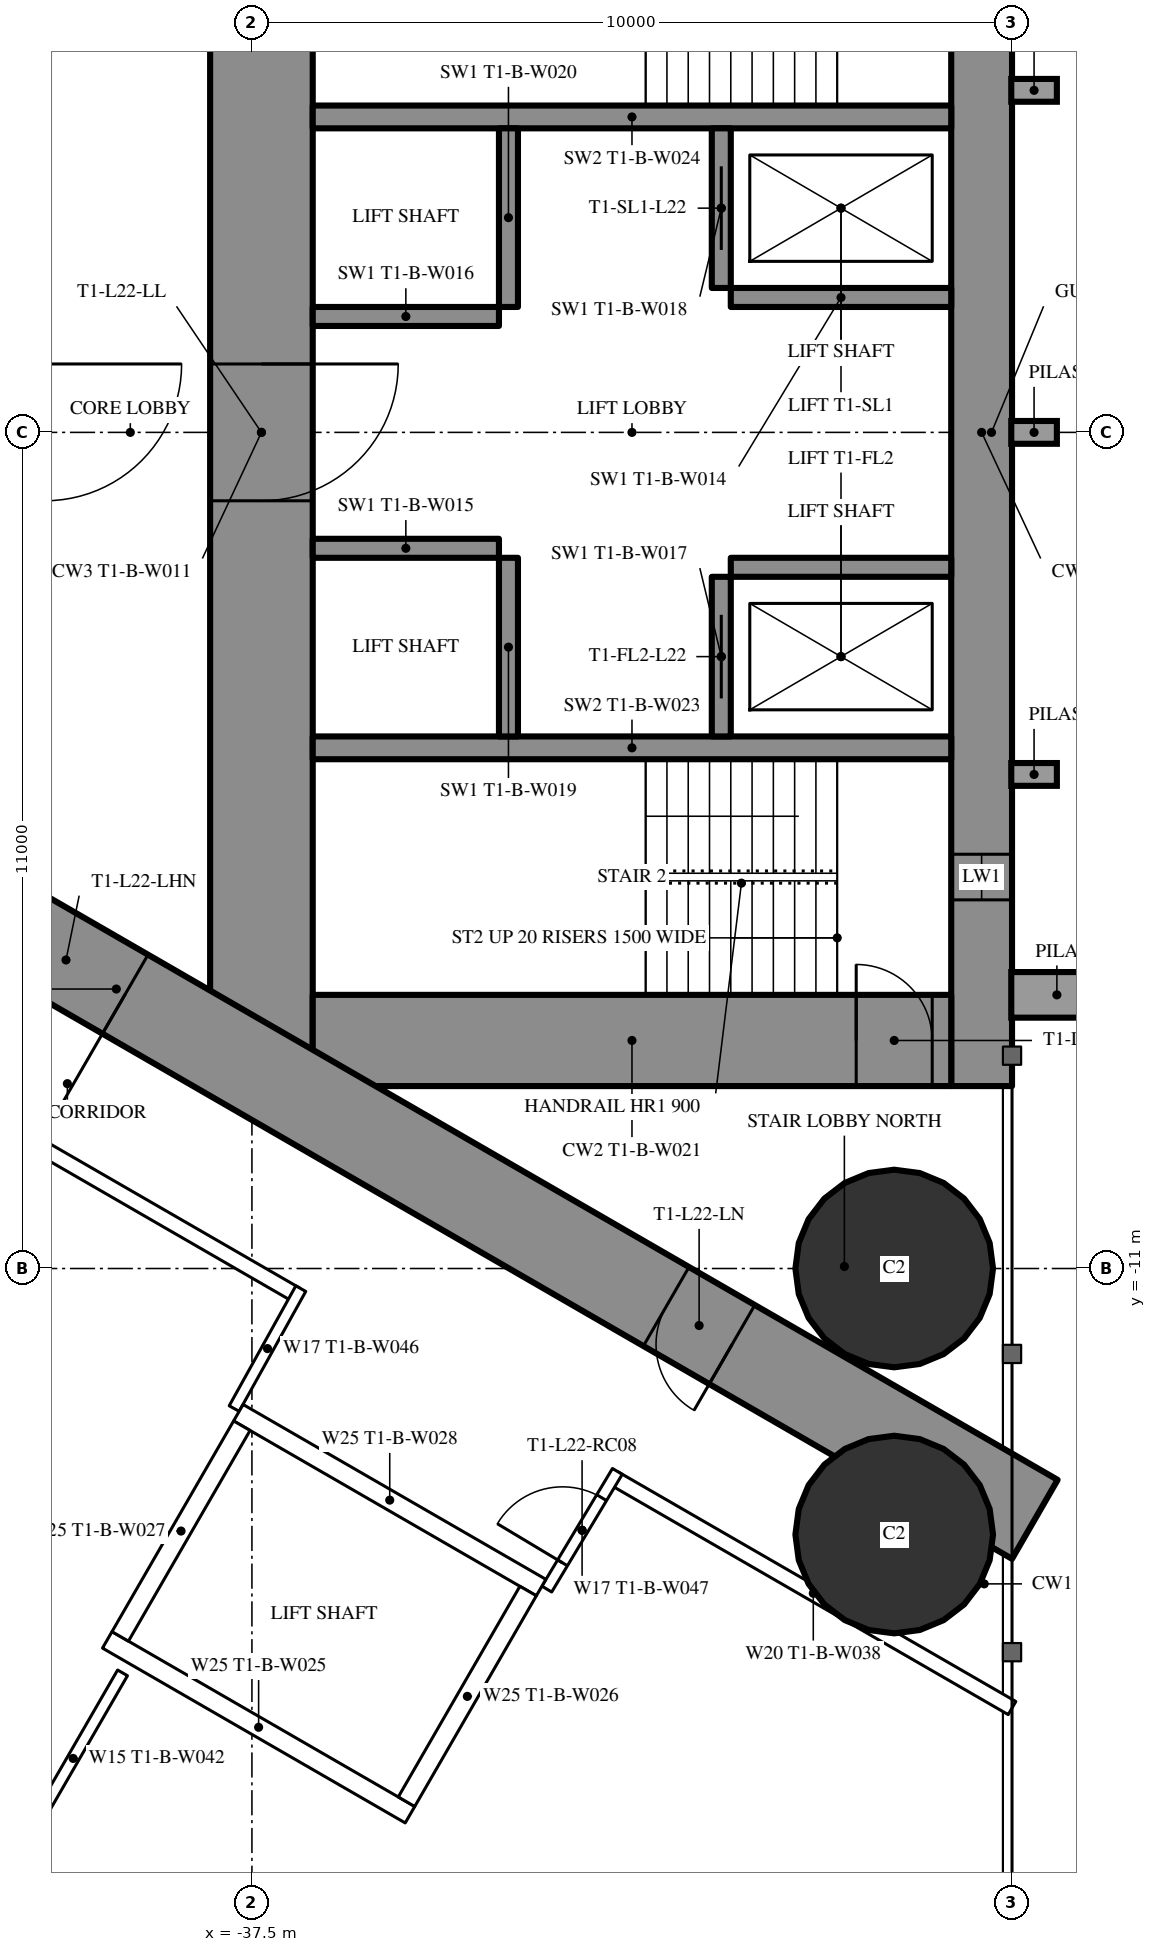
"""IFC4 building model, lengths in metres.
Left out: names, types, materials, properties, quantities, classifications, styles, units other than length and angle.
Written with IfcOpenShell. Run it as: python <this file> out.ifc"""

import sys

from ifc_helpers import new_model, si_unit, direction, frame, frame_2d, origin, origin_2d, place, context, subcontext, project, spatial, rectangle, hollow_circle, extrude, element, fill, save


model = new_model("IFC4")
c1 = context("Model", 3, precision=1e-05, world=origin(), true_north=direction((0.0, 1.0)))
c2 = subcontext(c1, "Body", "Model", "MODEL_VIEW")
j1 = project(units=[si_unit("LENGTHUNIT", "METRE"), si_unit("PLANEANGLEUNIT", "RADIAN")], contexts=[c1])
p1 = place(None, origin())
s1 = spatial("IfcSite", under=j1, at=p1, CompositionType="ELEMENT")
p2 = place(p1, origin())
s2 = spatial("IfcBuilding", under=s1, at=p2, CompositionType="ELEMENT")
p3 = place(p2, frame((0.0, 0.0, 87.0)))
s3 = spatial("IfcBuildingStorey", under=s2, at=p3, CompositionType="ELEMENT", Elevation=87.0)
for number, where, z_axis, x_axis in (
    (1, (-29.05, -11.0, 0.0), (0.0, 0.0, 1.0), (1.0, 0.0, 0.0)),
    (2, (-29.05, -14.5, 0.0), (0.0, 0.0, 1.0), (1.0, 0.0, 0.0)),
    (3, (-41.245, -19.666, 0.0), (0.0, 0.0, 1.0), (1.0, 0.0, 0.0)),
):
    element("IfcColumn", number, at=place(p3, frame(where, z_axis=z_axis, x_axis=x_axis)), inside=s3, PredefinedType="COLUMN", context=c2, shape_type="SweptSolid", body=[
        extrude(hollow_circle(Radius=1.3, WallThickness=0.1, at=origin_2d()), origin(), (0.0, 0.0, 1.0), 3.6),
    ])
p4 = place(p3, frame((-27.9, 8.6, 0.0), z_axis=(0.0, 0.0, 1.0), x_axis=(0.0, -1.0, 0.0)))
e4 = element("IfcWall", 4, at=p4, inside=s3, PredefinedType="SHEAR", context=c2, shape_type="SweptSolid", body=[
    extrude(rectangle(XDim=17.2, YDim=0.8, at=frame_2d((8.6, 0.0))), origin(), (0.0, 0.0, 1.0), 3.6),
])
p5 = place(p4, frame((2.45, 0.0, 0.6)))
e5 = element("IfcOpeningElement", 5, at=p5, cuts=e4, PredefinedType="OPENING", context=c2, shape_type="SweptSolid", body=[
    extrude(rectangle(XDim=0.6, YDim=2.1, at=frame_2d((0.3, 1.05))), frame((0.0, 0.41, 0.0), z_axis=(0.0, -1.0, 0.0), x_axis=(1.0, 0.0, 0.0)), (0.0, 0.0, 1.0), 0.82),
])
p6 = place(p4, frame((14.15, 0.0, 0.6)))
e6 = element("IfcOpeningElement", 6, at=p6, cuts=e4, PredefinedType="OPENING", context=c2, shape_type="SweptSolid", body=[
    extrude(rectangle(XDim=0.6, YDim=2.1, at=frame_2d((0.3, 1.05))), frame((0.0, 0.41, 0.0), z_axis=(0.0, -1.0, 0.0), x_axis=(1.0, 0.0, 0.0)), (0.0, 0.0, 1.0), 0.82),
])
p7 = place(p3, frame((-37.375, 8.6, 0.0), z_axis=(0.0, 0.0, 1.0), x_axis=(0.0, -1.0, 0.0)))
e7 = element("IfcWall", 7, at=p7, inside=s3, PredefinedType="SHEAR", context=c2, shape_type="SweptSolid", body=[
    extrude(rectangle(XDim=17.2, YDim=1.35, at=frame_2d((8.6, 0.0))), origin(), (0.0, 0.0, 1.0), 3.6),
])
p8 = place(p7, frame((7.7, 0.0, 0.0)))
e8 = element("IfcOpeningElement", 8, at=p8, cuts=e7, PredefinedType="OPENING", context=c2, shape_type="SweptSolid", body=[
    extrude(rectangle(XDim=1.8, YDim=2.2, at=frame_2d((0.9, 1.1))), frame((0.0, 0.685, 0.0), z_axis=(0.0, -1.0, 0.0), x_axis=(1.0, 0.0, 0.0)), (0.0, 0.0, 1.0), 1.37),
])
p9 = place(p3, frame((-28.3, -8.0, 0.0), z_axis=(0.0, 0.0, 1.0), x_axis=(-1.0, 0.0, 0.0)))
e9 = element("IfcWall", 9, at=p9, inside=s3, PredefinedType="SHEAR", context=c2, shape_type="SweptSolid", body=[
    extrude(rectangle(XDim=8.4, YDim=1.2, at=frame_2d((4.2, 0.0))), origin(), (0.0, 0.0, 1.0), 3.6),
])
p10 = place(p9, frame((0.25, 0.0, 0.0)))
e10 = element("IfcOpeningElement", 10, at=p10, cuts=e9, PredefinedType="OPENING", context=c2, shape_type="SweptSolid", body=[
    extrude(rectangle(XDim=1.0, YDim=2.2, at=frame_2d((0.5, 1.1))), frame((0.0, 0.61, 0.0), z_axis=(0.0, -1.0, 0.0), x_axis=(1.0, 0.0, 0.0)), (0.0, 0.0, 1.0), 1.22),
])
for number, where, z_axis, x_axis in (
    (11, (-28.3, 4.15, 0.0), (0.0, 0.0, 1.0), (-1.0, 0.0, 0.0)),
    (12, (-28.3, -4.15, 0.0), (0.0, 0.0, 1.0), (-1.0, 0.0, 0.0)),
):
    element("IfcWall", number, at=place(p3, frame(where, z_axis=z_axis, x_axis=x_axis)), inside=s3, PredefinedType="SHEAR", context=c2, shape_type="SweptSolid", body=[
        extrude(rectangle(XDim=8.4, YDim=0.3, at=frame_2d((4.2, 0.0))), origin(), (0.0, 0.0, 1.0), 3.6),
    ])
p11 = place(p3, frame((-31.325, 4.0, 0.0), z_axis=(0.0, 0.0, 1.0), x_axis=(0.0, -1.0, 0.0)))
e13 = element("IfcWall", 13, at=p11, inside=s3, PredefinedType="SHEAR", context=c2, shape_type="SweptSolid", body=[
    extrude(rectangle(XDim=2.1, YDim=0.25, at=frame_2d((1.05, 0.0))), origin(), (0.0, 0.0, 1.0), 3.6),
])
p12 = place(p11, frame((0.5, 0.0, 0.0)))
e14 = element("IfcOpeningElement", 14, at=p12, cuts=e13, PredefinedType="OPENING", context=c2, shape_type="SweptSolid", body=[
    extrude(rectangle(XDim=1.1, YDim=2.2, at=frame_2d((0.55, 1.1))), frame((0.0, 0.135, 0.0), z_axis=(0.0, -1.0, 0.0), x_axis=(1.0, 0.0, 0.0)), (0.0, 0.0, 1.0), 0.27),
])
p13 = place(p3, frame((-34.125, 4.0, 0.0), z_axis=(0.0, 0.0, 1.0), x_axis=(0.0, -1.0, 0.0)))
e15 = element("IfcWall", 15, at=p13, inside=s3, PredefinedType="SHEAR", context=c2, shape_type="SweptSolid", body=[
    extrude(rectangle(XDim=2.35, YDim=0.25, at=frame_2d((1.175, 0.0))), origin(), (0.0, 0.0, 1.0), 3.6),
])
p14 = place(p3, frame((-28.3, 1.775, 0.0), z_axis=(0.0, 0.0, 1.0), x_axis=(-1.0, 0.0, 0.0)))
e16 = element("IfcWall", 16, at=p14, inside=s3, PredefinedType="SHEAR", context=c2, shape_type="SweptSolid", body=[
    extrude(rectangle(XDim=2.9, YDim=0.25, at=frame_2d((1.45, 0.0))), origin(), (0.0, 0.0, 1.0), 3.6),
])
p15 = place(p3, frame((-34.25, 1.525, 0.0), z_axis=(0.0, 0.0, 1.0), x_axis=(-1.0, 0.0, 0.0)))
e17 = element("IfcWall", 17, at=p15, inside=s3, PredefinedType="SHEAR", context=c2, shape_type="SweptSolid", body=[
    extrude(rectangle(XDim=2.45, YDim=0.25, at=frame_2d((1.225, 0.0))), origin(), (0.0, 0.0, 1.0), 3.6),
])
p16 = place(p3, frame((-31.325, -1.9, 0.0), z_axis=(0.0, 0.0, 1.0), x_axis=(0.0, -1.0, 0.0)))
e18 = element("IfcWall", 18, at=p16, inside=s3, PredefinedType="SHEAR", context=c2, shape_type="SweptSolid", body=[
    extrude(rectangle(XDim=2.1, YDim=0.25, at=frame_2d((1.05, 0.0))), origin(), (0.0, 0.0, 1.0), 3.6),
])
p17 = place(p16, frame((0.5, 0.0, 0.0)))
e19 = element("IfcOpeningElement", 19, at=p17, cuts=e18, PredefinedType="OPENING", context=c2, shape_type="SweptSolid", body=[
    extrude(rectangle(XDim=1.1, YDim=2.2, at=frame_2d((0.55, 1.1))), frame((0.0, 0.135, 0.0), z_axis=(0.0, -1.0, 0.0), x_axis=(1.0, 0.0, 0.0)), (0.0, 0.0, 1.0), 0.27),
])
p18 = place(p3, frame((-34.125, -1.65, 0.0), z_axis=(0.0, 0.0, 1.0), x_axis=(0.0, -1.0, 0.0)))
e20 = element("IfcWall", 20, at=p18, inside=s3, PredefinedType="SHEAR", context=c2, shape_type="SweptSolid", body=[
    extrude(rectangle(XDim=2.35, YDim=0.25, at=frame_2d((1.175, 0.0))), origin(), (0.0, 0.0, 1.0), 3.6),
])
p19 = place(p3, frame((-28.3, -1.775, 0.0), z_axis=(0.0, 0.0, 1.0), x_axis=(-1.0, 0.0, 0.0)))
e21 = element("IfcWall", 21, at=p19, inside=s3, PredefinedType="SHEAR", context=c2, shape_type="SweptSolid", body=[
    extrude(rectangle(XDim=2.9, YDim=0.25, at=frame_2d((1.45, 0.0))), origin(), (0.0, 0.0, 1.0), 3.6),
])
p20 = place(p3, frame((-34.25, -1.525, 0.0), z_axis=(0.0, 0.0, 1.0), x_axis=(-1.0, 0.0, 0.0)))
e22 = element("IfcWall", 22, at=p20, inside=s3, PredefinedType="SHEAR", context=c2, shape_type="SweptSolid", body=[
    extrude(rectangle(XDim=2.45, YDim=0.25, at=frame_2d((1.225, 0.0))), origin(), (0.0, 0.0, 1.0), 3.6),
])
p21 = place(p3, frame((-27.2, 14.3, 0.0), z_axis=(0.0, 0.0, 1.0), x_axis=(-0.866026593062, -0.499997940104, 0.0)))
e23 = element("IfcWall", 23, at=p21, inside=s3, PredefinedType="SHEAR", context=c2, shape_type="SweptSolid", body=[
    extrude(rectangle(XDim=28.946, YDim=1.2, at=frame_2d((14.473, 0.0))), origin(), (0.0, 0.0, 1.0), 3.6),
])
p22 = place(p21, frame((4.6, 0.0, 0.0)))
e24 = element("IfcOpeningElement", 24, at=p22, cuts=e23, PredefinedType="OPENING", context=c2, shape_type="SweptSolid", body=[
    extrude(rectangle(XDim=1.0, YDim=2.2, at=frame_2d((0.5, 1.1))), frame((0.0, 0.61, 0.0), z_axis=(0.0, -1.0, 0.0), x_axis=(1.0, 0.0, 0.0)), (0.0, 0.0, 1.0), 1.22),
])
p23 = place(p21, frame((13.568, 0.0, 0.0)))
e25 = element("IfcOpeningElement", 25, at=p23, cuts=e23, PredefinedType="OPENING", context=c2, shape_type="SweptSolid", body=[
    extrude(rectangle(XDim=1.8, YDim=2.03, at=frame_2d((0.9, 1.015))), frame((0.0, 0.61, 0.0), z_axis=(0.0, -1.0, 0.0), x_axis=(1.0, 0.0, 0.0)), (0.0, 0.0, 1.0), 1.22),
])
p24 = place(p3, frame((-27.2, -14.3, 0.0), z_axis=(0.0, 0.0, 1.0), x_axis=(-0.866024021859, 0.500002393557, 0.0)))
e26 = element("IfcWall", 26, at=p24, inside=s3, PredefinedType="SHEAR", context=c2, shape_type="SweptSolid", body=[
    extrude(rectangle(XDim=27.907, YDim=1.2, at=frame_2d((13.954, 0.0))), origin(), (0.0, 0.0, 1.0), 3.6),
])
p25 = place(p24, frame((4.6, 0.0, 0.0)))
e27 = element("IfcOpeningElement", 27, at=p25, cuts=e26, PredefinedType="OPENING", context=c2, shape_type="SweptSolid", body=[
    extrude(rectangle(XDim=1.0, YDim=2.2, at=frame_2d((0.5, 1.1))), frame((0.0, 0.61, 0.0), z_axis=(0.0, -1.0, 0.0), x_axis=(1.0, 0.0, 0.0)), (0.0, 0.0, 1.0), 1.22),
])
p26 = place(p24, frame((13.818, 0.0, 0.0)))
e28 = element("IfcOpeningElement", 28, at=p26, cuts=e26, PredefinedType="OPENING", context=c2, shape_type="SweptSolid", body=[
    extrude(rectangle(XDim=1.8, YDim=2.2, at=frame_2d((0.9, 1.1))), frame((0.0, 0.61, 0.0), z_axis=(0.0, -1.0, 0.0), x_axis=(1.0, 0.0, 0.0)), (0.0, 0.0, 1.0), 1.22),
])
p27 = place(p3, frame((-39.202, -16.32, 0.0), z_axis=(0.0, 0.0, 1.0), x_axis=(-0.49997716683, -0.86603858612, 0.0)))
e29 = element("IfcWall", 29, at=p27, inside=s3, PredefinedType="PARTITIONING", context=c2, shape_type="SweptSolid", body=[
    extrude(rectangle(XDim=2.6, YDim=0.15, at=frame_2d((1.3, 0.0))), origin(), (0.0, 0.0, 1.0), 3.35),
])
p28 = place(p3, frame((-37.7, 10.894, 0.0), z_axis=(0.0, 0.0, 1.0), x_axis=(-0.866027905338, -0.499995667157, 0.0)))
e30 = element("IfcWall", 30, at=p28, inside=s3, PredefinedType="PARTITIONING", context=c2, shape_type="SweptSolid", body=[
    extrude(rectangle(XDim=21.787, YDim=0.2, at=frame_2d((10.894, 0.0))), origin(), (0.0, 0.0, 1.0), 3.35),
])
p29 = place(p28, frame((15.094, 0.0, 0.0)))
e31 = element("IfcOpeningElement", 31, at=p29, cuts=e30, PredefinedType="OPENING", context=c2, shape_type="SweptSolid", body=[
    extrude(rectangle(XDim=1.8, YDim=2.2, at=frame_2d((0.9, 1.1))), frame((0.0, 0.11, 0.0), z_axis=(0.0, -1.0, 0.0), x_axis=(1.0, 0.0, 0.0)), (0.0, 0.0, 1.0), 0.22),
])
p30 = place(p28, frame((4.201, 0.0, 0.0)))
e32 = element("IfcOpeningElement", 32, at=p30, cuts=e30, PredefinedType="OPENING", context=c2, shape_type="SweptSolid", body=[
    extrude(rectangle(XDim=1.8, YDim=2.2, at=frame_2d((0.9, 1.1))), frame((0.0, 0.11, 0.0), z_axis=(0.0, -1.0, 0.0), x_axis=(1.0, 0.0, 0.0)), (0.0, 0.0, 1.0), 0.22),
])
p31 = place(p3, frame((-27.5, -16.782, 0.0), z_axis=(0.0, 0.0, 1.0), x_axis=(-0.866030050624, 0.499991951352, 0.0)))
e33 = element("IfcWall", 33, at=p31, inside=s3, PredefinedType="PARTITIONING", context=c2, shape_type="SweptSolid", body=[
    extrude(rectangle(XDim=6.038, YDim=0.2, at=frame_2d((3.019, 0.0))), origin(), (0.0, 0.0, 1.0), 3.35),
])
p32 = place(p3, frame((-36.92, -11.344, 0.0), z_axis=(0.0, 0.0, 1.0), x_axis=(-0.866028313256, 0.499994960614, 0.0)))
e34 = element("IfcWall", 34, at=p32, inside=s3, PredefinedType="PARTITIONING", context=c2, shape_type="SweptSolid", body=[
    extrude(rectangle(XDim=22.568, YDim=0.2, at=frame_2d((11.284, 0.0))), origin(), (0.0, 0.0, 1.0), 3.35),
])
p33 = place(p32, frame((15.994, 0.0, 0.0)))
e35 = element("IfcOpeningElement", 35, at=p33, cuts=e34, PredefinedType="OPENING", context=c2, shape_type="SweptSolid", body=[
    extrude(rectangle(XDim=1.8, YDim=2.2, at=frame_2d((0.9, 1.1))), frame((0.0, 0.11, 0.0), z_axis=(0.0, -1.0, 0.0), x_axis=(1.0, 0.0, 0.0)), (0.0, 0.0, 1.0), 0.22),
])
p34 = place(p32, frame((4.551, 0.0, 0.0)))
e36 = element("IfcOpeningElement", 36, at=p34, cuts=e34, PredefinedType="OPENING", context=c2, shape_type="SweptSolid", body=[
    extrude(rectangle(XDim=2.0, YDim=2.4, at=frame_2d((1.0, 1.2))), frame((0.0, 0.11, 0.0), z_axis=(0.0, -1.0, 0.0), x_axis=(1.0, 0.0, 0.0)), (0.0, 0.0, 1.0), 0.22),
])
p35 = place(p3, frame((-36.857, -11.265, 0.0), z_axis=(0.0, 0.0, 1.0), x_axis=(-0.485482130951, -0.874246590229, 0.0)))
e37 = element("IfcWall", 37, at=p35, inside=s3, PredefinedType="PARTITIONING", context=c2, shape_type="SweptSolid", body=[
    extrude(rectangle(XDim=1.805, YDim=0.15, at=frame_2d((0.902, 0.0))), origin(), (0.0, 0.0, 1.0), 3.35),
])
p36 = place(p3, frame((-33.621, -15.218, 0.0), z_axis=(0.0, 0.0, 1.0), x_axis=(0.514336634837, 0.857588377991, 0.0)))
e38 = element("IfcWall", 38, at=p36, inside=s3, PredefinedType="PARTITIONING", context=c2, shape_type="SweptSolid", body=[
    extrude(rectangle(XDim=1.805, YDim=0.15, at=frame_2d((0.903, 0.0))), origin(), (0.0, 0.0, 1.0), 3.35),
])
p37 = place(p36, frame((0.403, 0.0, 0.0)))
e39 = element("IfcOpeningElement", 39, at=p37, cuts=e38, PredefinedType="OPENING", context=c2, shape_type="SweptSolid", body=[
    extrude(rectangle(XDim=1.0, YDim=2.03, at=frame_2d((0.5, 1.015))), frame((0.0, 0.085, 0.0), z_axis=(0.0, -1.0, 0.0), x_axis=(1.0, 0.0, 0.0)), (0.0, 0.0, 1.0), 0.17),
])
p38 = place(p3, frame((-33.696, -15.197, 0.0), z_axis=(0.0, 0.0, 1.0), x_axis=(-0.865976953817, 0.500083908417, 0.0)))
e40 = element("IfcWall", 40, at=p38, inside=s3, PredefinedType="PARTITIONING", context=c2, shape_type="SweptSolid", body=[
    extrude(rectangle(XDim=4.599, YDim=0.25, at=frame_2d((2.3, 0.0))), origin(), (0.0, 0.0, 1.0), 3.35),
])
p39 = place(p3, frame((-35.42, -18.186, 0.0), z_axis=(0.0, 0.0, 1.0), x_axis=(-0.865990227814, 0.50006092162, 0.0)))
e41 = element("IfcWall", 41, at=p39, inside=s3, PredefinedType="PARTITIONING", context=c2, shape_type="SweptSolid", body=[
    extrude(rectangle(XDim=4.6, YDim=0.25, at=frame_2d((2.3, 0.0))), origin(), (0.0, 0.0, 1.0), 3.35),
])
p40 = place(p3, frame((-33.866, -15.243, 0.0), z_axis=(0.0, 0.0, 1.0), x_axis=(-0.499929347863, -0.866066190972, 0.0)))
e42 = element("IfcWall", 42, at=p40, inside=s3, PredefinedType="PARTITIONING", context=c2, shape_type="SweptSolid", body=[
    extrude(rectangle(XDim=3.201, YDim=0.25, at=frame_2d((1.6, 0.0))), origin(), (0.0, 0.0, 1.0), 3.35),
])
p41 = place(p3, frame((-37.633, -13.068, 0.0), z_axis=(0.0, 0.0, 1.0), x_axis=(-0.499872130319, -0.866099216793, 0.0)))
e43 = element("IfcWall", 43, at=p41, inside=s3, PredefinedType="PARTITIONING", context=c2, shape_type="SweptSolid", body=[
    extrude(rectangle(XDim=3.2, YDim=0.25, at=frame_2d((1.6, 0.0))), origin(), (0.0, 0.0, 1.0), 3.35),
])
p42 = place(p37, origin())
e44 = element("IfcDoor", 44, at=p42, inside=s3, OperationType="SINGLE_SWING_LEFT", PredefinedType="DOOR", context=c2, shape_type="SweptSolid", body=[
    extrude(rectangle(XDim=1.0, YDim=2.03, at=frame_2d((0.5, 1.015))), frame((0.0, 0.025, 0.0), z_axis=(0.0, -1.0, 0.0), x_axis=(1.0, 0.0, 0.0)), (0.0, 0.0, 1.0), 0.05),
])
fill(e39, e44)
p43 = place(p25, origin())
e45 = element("IfcDoor", 45, at=p43, inside=s3, OperationType="SINGLE_SWING_LEFT", PredefinedType="DOOR", context=c2, shape_type="SweptSolid", body=[
    extrude(rectangle(XDim=1.0, YDim=2.2, at=frame_2d((0.5, 1.1))), frame((0.0, 0.025, 0.0), z_axis=(0.0, -1.0, 0.0), x_axis=(1.0, 0.0, 0.0)), (0.0, 0.0, 1.0), 0.05),
])
fill(e27, e45)
p44 = place(p26, origin())
e46 = element("IfcDoor", 46, at=p44, inside=s3, OperationType="DOUBLE_DOOR_SINGLE_SWING", PredefinedType="DOOR", context=c2, shape_type="SweptSolid", body=[
    extrude(rectangle(XDim=1.8, YDim=2.2, at=frame_2d((0.9, 1.1))), frame((0.0, 0.025, 0.0), z_axis=(0.0, -1.0, 0.0), x_axis=(1.0, 0.0, 0.0)), (0.0, 0.0, 1.0), 0.05),
])
fill(e28, e46)
p45 = place(p8, origin())
e47 = element("IfcDoor", 47, at=p45, inside=s3, OperationType="DOUBLE_DOOR_SINGLE_SWING", PredefinedType="DOOR", context=c2, shape_type="SweptSolid", body=[
    extrude(rectangle(XDim=1.8, YDim=2.2, at=frame_2d((0.9, 1.1))), frame((0.0, 0.025, 0.0), z_axis=(0.0, -1.0, 0.0), x_axis=(1.0, 0.0, 0.0)), (0.0, 0.0, 1.0), 0.05),
])
fill(e8, e47)
p46 = place(p10, origin())
e48 = element("IfcDoor", 48, at=p46, inside=s3, OperationType="SINGLE_SWING_RIGHT", PredefinedType="DOOR", context=c2, shape_type="SweptSolid", body=[
    extrude(rectangle(XDim=1.0, YDim=2.2, at=frame_2d((0.5, 1.1))), frame((0.0, 0.025, 0.0), z_axis=(0.0, -1.0, 0.0), x_axis=(1.0, 0.0, 0.0)), (0.0, 0.0, 1.0), 0.05),
])
fill(e10, e48)
p47 = place(p12, origin())
e49 = element("IfcDoor", 49, at=p47, inside=s3, OperationType="SLIDING_TO_LEFT", PredefinedType="USERDEFINED", context=c2, shape_type="SweptSolid", body=[
    extrude(rectangle(XDim=1.1, YDim=2.2, at=frame_2d((0.55, 1.1))), frame((0.0, 0.025, 0.0), z_axis=(0.0, -1.0, 0.0), x_axis=(1.0, 0.0, 0.0)), (0.0, 0.0, 1.0), 0.05),
])
fill(e14, e49)
p48 = place(p17, origin())
e50 = element("IfcDoor", 50, at=p48, inside=s3, OperationType="SLIDING_TO_LEFT", PredefinedType="USERDEFINED", context=c2, shape_type="SweptSolid", body=[
    extrude(rectangle(XDim=1.1, YDim=2.2, at=frame_2d((0.55, 1.1))), frame((0.0, 0.025, 0.0), z_axis=(0.0, -1.0, 0.0), x_axis=(1.0, 0.0, 0.0)), (0.0, 0.0, 1.0), 0.05),
])
fill(e19, e50)
p49 = place(p6, origin())
e51 = element("IfcWindow", 51, at=p49, inside=s3, PartitioningType="SINGLE_PANEL", PredefinedType="WINDOW", context=c2, shape_type="SweptSolid", body=[
    extrude(rectangle(XDim=0.6, YDim=2.1, at=frame_2d((0.3, 1.05))), frame((0.0, 0.03, 0.0), z_axis=(0.0, -1.0, 0.0), x_axis=(1.0, 0.0, 0.0)), (0.0, 0.0, 1.0), 0.06),
])
fill(e6, e51)
save(model, sys.argv[1])
